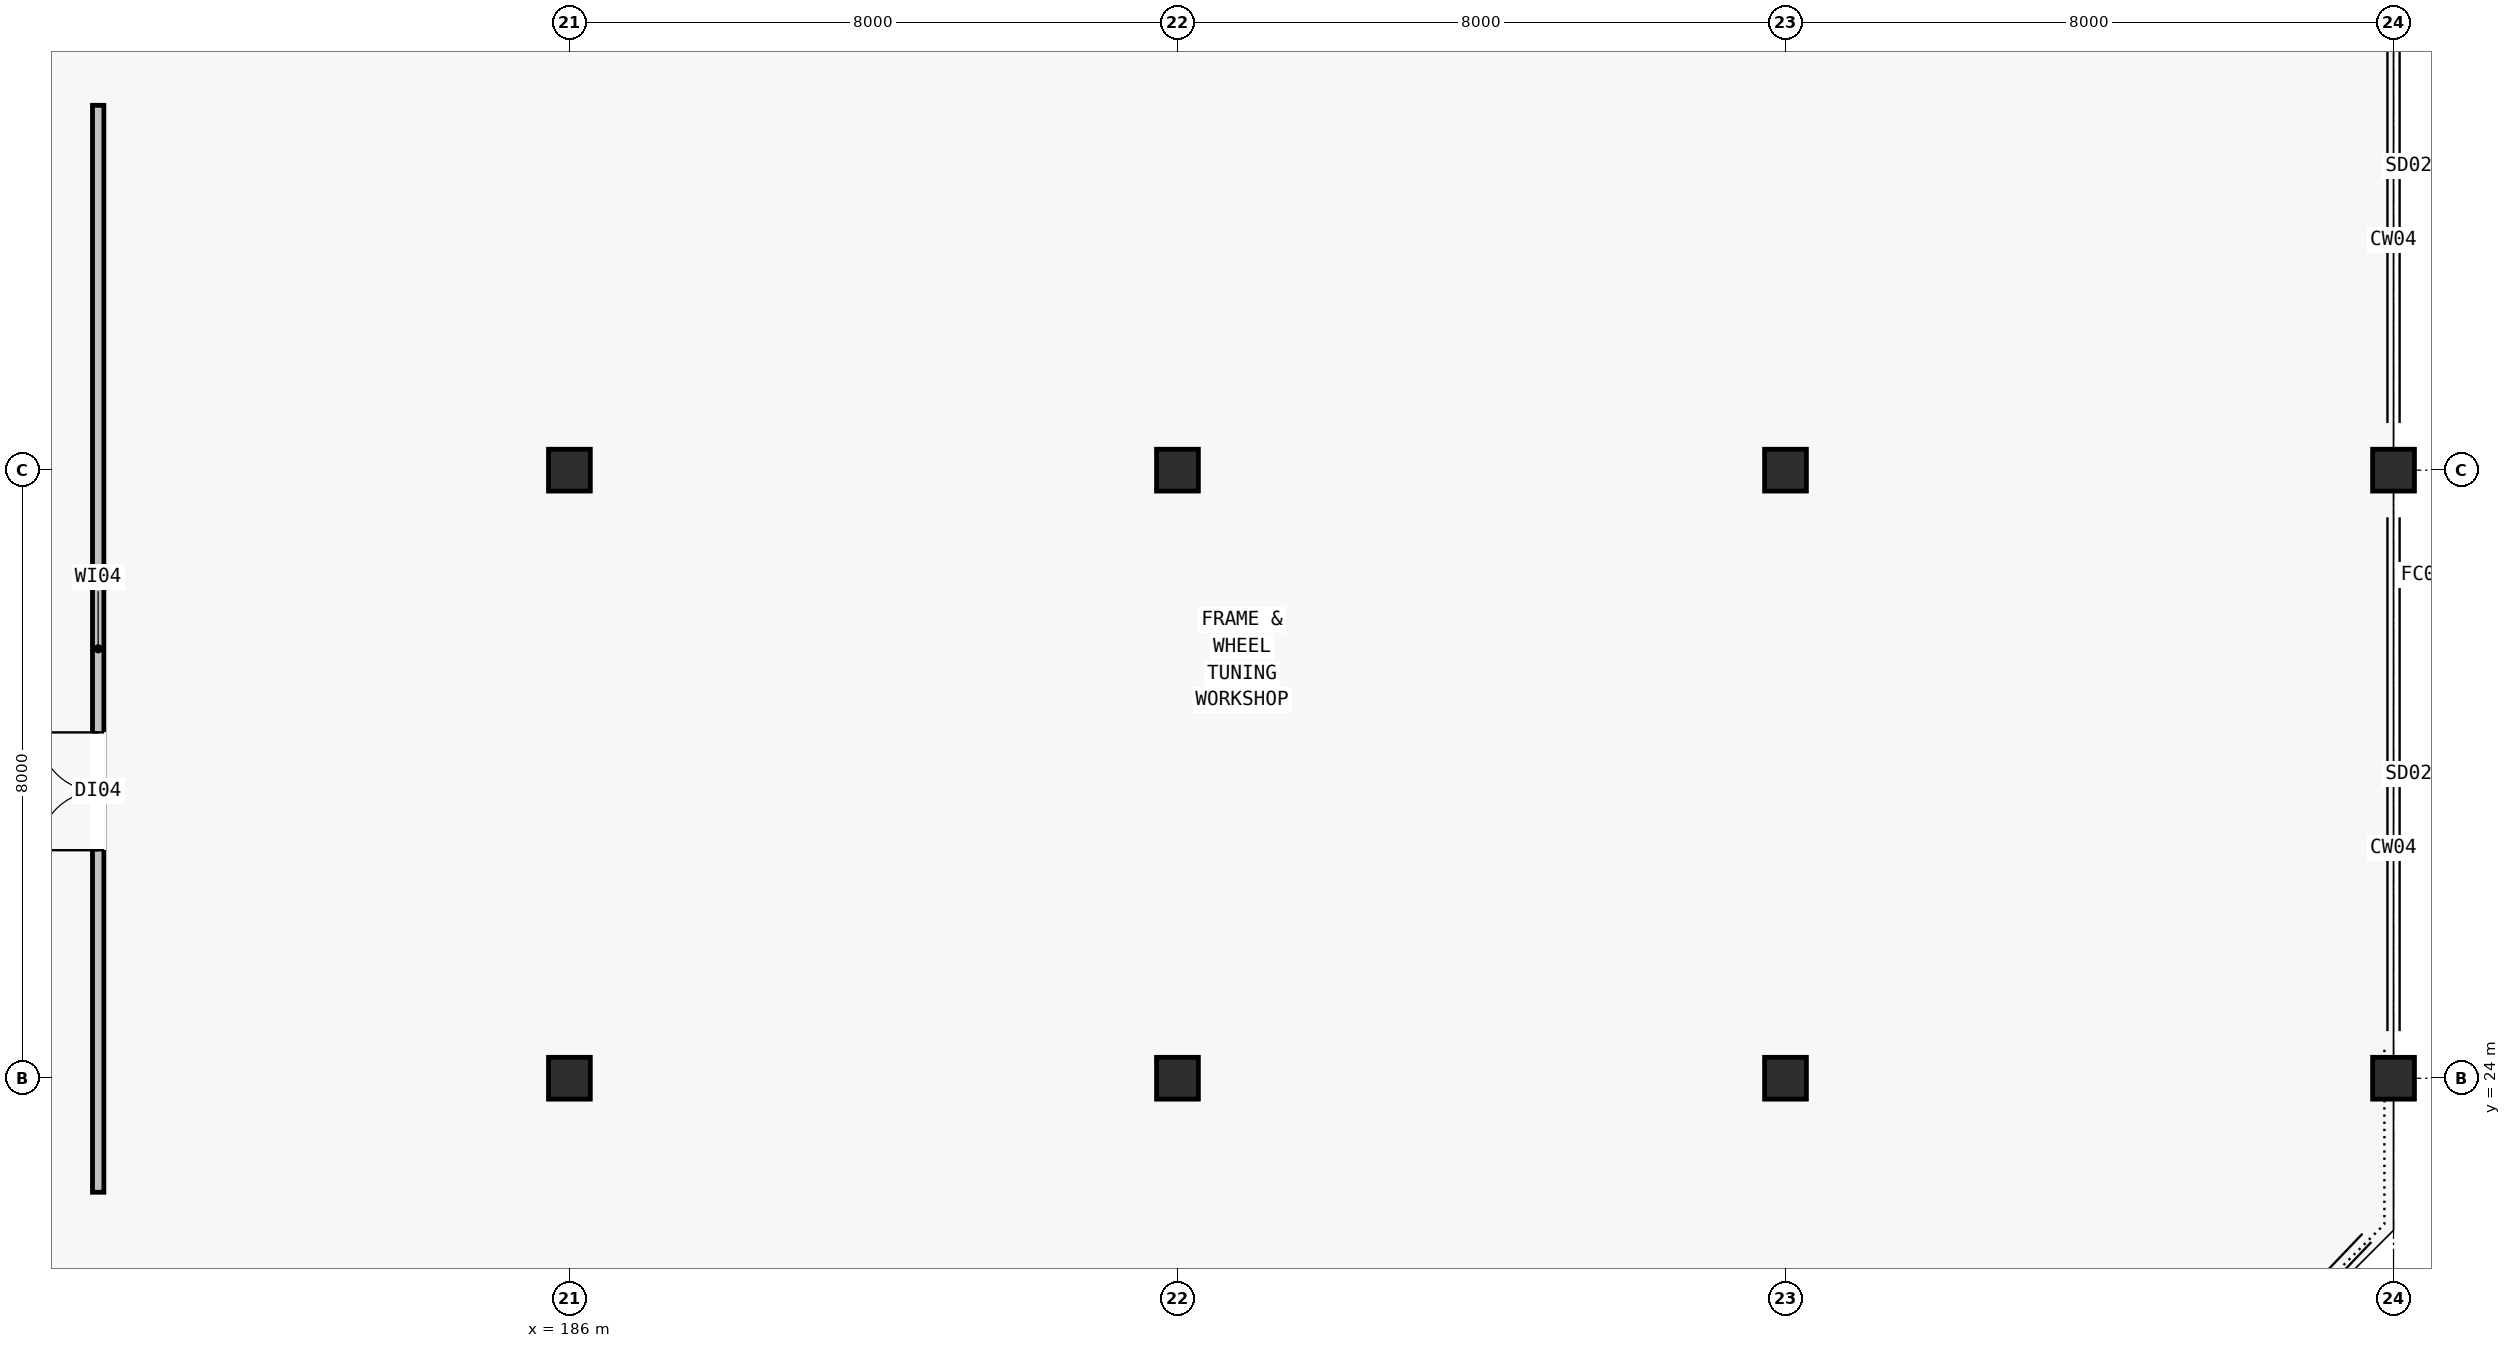
"""IFC4 building model, lengths in metres.
Left out: names, types, materials, properties, quantities, classifications, styles, units other than length and angle.
Written with IfcOpenShell. Run it as: python <this file> out.ifc"""

import sys

from ifc_helpers import new_model, si_unit, direction, frame, frame_2d, origin, origin_2d, place, context, subcontext, project, spatial, rectangle, extrude, element, fill, save


model = new_model("IFC4")
c1 = context("Model", 3, precision=1e-05, world=origin(), true_north=direction((0.0, 1.0)))
c2 = subcontext(c1, "Body", "Model", "MODEL_VIEW")
j1 = project(units=[si_unit("LENGTHUNIT", "METRE"), si_unit("PLANEANGLEUNIT", "RADIAN")], contexts=[c1])
p1 = place(None, origin())
s1 = spatial("IfcSite", under=j1, at=p1, CompositionType="ELEMENT")
p2 = place(p1, origin())
s2 = spatial("IfcBuilding", under=s1, at=p2, CompositionType="ELEMENT")
p3 = place(p2, frame((0.0, 0.0, 9.5)))
s3 = spatial("IfcBuildingStorey", under=s2, at=p3, CompositionType="ELEMENT", Elevation=9.5)
for number, where, z_axis, x_axis in (
    (1, (186.0, 24.0, 0.0), (0.0, 0.0, 1.0), (1.0, 0.0, 0.0)),
    (2, (186.0, 32.0, 0.0), (0.0, 0.0, 1.0), (1.0, 0.0, 0.0)),
    (3, (194.0, 24.0, 0.0), (0.0, 0.0, 1.0), (1.0, 0.0, 0.0)),
    (4, (194.0, 32.0, 0.0), (0.0, 0.0, 1.0), (1.0, 0.0, 0.0)),
    (5, (202.0, 24.0, 0.0), (0.0, 0.0, 1.0), (1.0, 0.0, 0.0)),
    (6, (202.0, 32.0, 0.0), (0.0, 0.0, 1.0), (1.0, 0.0, 0.0)),
    (7, (210.0, 24.0, 0.0), (0.0, 0.0, 1.0), (1.0, 0.0, 0.0)),
    (8, (210.0, 32.0, 0.0), (0.0, 0.0, 1.0), (1.0, 0.0, 0.0)),
):
    element("IfcColumn", number, at=place(p3, frame(where, z_axis=z_axis, x_axis=x_axis)), inside=s3, PredefinedType="COLUMN", context=c2, shape_type="SweptSolid", body=[
        extrude(rectangle(XDim=0.55, YDim=0.55, at=origin_2d()), origin(), (0.0, 0.0, 1.0), 3.9),
    ])
p4 = place(p3, frame((179.8, 22.5, 0.0), z_axis=(0.0, 0.0, 1.0), x_axis=(0.0, 1.0, 0.0)))
e9 = element("IfcWall", 9, at=p4, inside=s3, PredefinedType="PARTITIONING", context=c2, shape_type="SweptSolid", body=[
    extrude(rectangle(XDim=14.3, YDim=0.15, at=frame_2d((7.15, 0.0))), origin(), (0.0, 0.0, 1.0), 2.48),
])
p5 = place(p4, frame((4.5, 0.0, 0.0)))
e10 = element("IfcOpeningElement", 10, at=p5, cuts=e9, PredefinedType="OPENING", context=c2, shape_type="SweptSolid", body=[
    extrude(rectangle(XDim=1.55, YDim=2.2, at=frame_2d((0.775, 1.1))), frame((0.0, 0.085, 0.0), z_axis=(0.0, -1.0, 0.0), x_axis=(1.0, 0.0, 0.0)), (0.0, 0.0, 1.0), 0.17),
])
p6 = place(p5, origin())
e11 = element("IfcDoor", 11, at=p6, inside=s3, OperationType="DOUBLE_SWING_LEFT", PredefinedType="DOOR", context=c2, shape_type="SweptSolid", body=[
    extrude(rectangle(XDim=1.55, YDim=2.2, at=frame_2d((0.775, 1.1))), frame((0.0, 0.025, 0.0), z_axis=(0.0, -1.0, 0.0), x_axis=(1.0, 0.0, 0.0)), (0.0, 0.0, 1.0), 0.05),
])
fill(e10, e11)
save(model, sys.argv[1])
